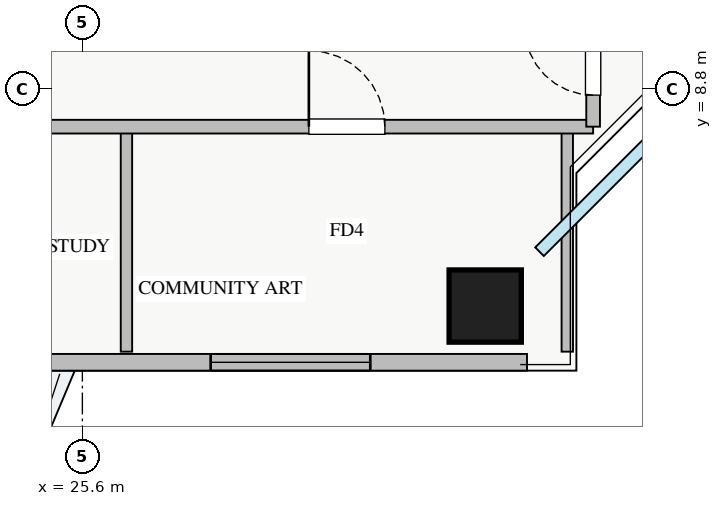
"""IFC4 building model, lengths in metres.
Left out: names, types, materials, properties, quantities, classifications, styles, units other than length and angle.
Written with IfcOpenShell. Run it as: python <this file> out.ifc"""

import sys

from ifc_helpers import new_model, si_unit, direction, frame, frame_2d, origin, origin_2d, place, context, subcontext, project, spatial, rectangle, extrude, source, transform, mapped, element, fill, save


model = new_model("IFC4")
c1 = context("Model", 3, precision=1e-05, world=origin(), true_north=direction((0.0, 1.0)))
c2 = subcontext(c1, "Body", "Model", "MODEL_VIEW")
j1 = project(units=[si_unit("LENGTHUNIT", "METRE"), si_unit("PLANEANGLEUNIT", "RADIAN")], contexts=[c1])
p1 = place(None, origin())
s1 = spatial("IfcSite", under=j1, at=p1, CompositionType="ELEMENT")
p2 = place(p1, origin())
s2 = spatial("IfcBuilding", under=s1, at=p2, CompositionType="ELEMENT")
p3 = place(p2, frame((0.0, 0.0, 173.0)))
s3 = spatial("IfcBuildingStorey", under=s2, at=p3, CompositionType="ELEMENT", Elevation=173.0)
m1 = source(origin(), c2, "Body", "SweptSolid", [
    extrude(rectangle(XDim=0.95, YDim=0.95, at=origin_2d()), origin(), (0.0, 0.0, 1.0), 3.25),
])
p4 = place(p3, frame((30.9, 5.95, 0.0), z_axis=(0.0, 0.0, 1.0), x_axis=(1.0, 0.0, 0.0)))
e1 = element("IfcColumn", 1, at=p4, inside=s3, PredefinedType="COLUMN", context=c2, shape_type="MappedRepresentation", body=[
    mapped(m1, transform((0.0, 0.0, 0.0), x_axis=(1.0, 0.0, 0.0), y_axis=(0.0, 1.0, 0.0), z_axis=(0.0, 0.0, 1.0), scale=1.0)),
])
p5 = place(p3, frame((6.55, 5.21, 0.0), z_axis=(0.0, 0.0, 1.0), x_axis=(1.0, 0.0, 0.0)))
e2 = element("IfcWall", 2, at=p5, inside=s3, PredefinedType="STANDARD", context=c2, shape_type="SweptSolid", body=[
    extrude(rectangle(XDim=24.9, YDim=0.22, at=frame_2d((12.45, 0.0))), origin(), (0.0, 0.0, 1.0), 2.54),
])
p6 = place(p5, frame((13.3, 0.0, 0.0)))
e3 = element("IfcOpeningElement", 3, at=p6, cuts=e2, PredefinedType="OPENING", context=c2, shape_type="SweptSolid", body=[
    extrude(rectangle(XDim=1.2, YDim=2.1, at=frame_2d((0.6, 1.05))), frame((0.0, 0.12, 0.0), z_axis=(0.0, -1.0, 0.0), x_axis=(1.0, 0.0, 0.0)), (0.0, 0.0, 1.0), 0.24),
])
p7 = place(p5, frame((0.373, 0.0, 0.9)))
e4 = element("IfcOpeningElement", 4, at=p7, cuts=e2, PredefinedType="OPENING", context=c2, shape_type="SweptSolid", body=[
    extrude(rectangle(XDim=1.5, YDim=1.5, at=frame_2d((0.75, 0.75))), frame((0.0, 0.12, 0.0), z_axis=(0.0, -1.0, 0.0), x_axis=(1.0, 0.0, 0.0)), (0.0, 0.0, 1.0), 0.24),
])
p8 = place(p5, frame((9.78, 0.0, 0.9)))
e5 = element("IfcOpeningElement", 5, at=p8, cuts=e2, PredefinedType="OPENING", context=c2, shape_type="SweptSolid", body=[
    extrude(rectangle(XDim=1.8, YDim=1.5, at=frame_2d((0.9, 0.75))), frame((0.0, 0.12, 0.0), z_axis=(0.0, -1.0, 0.0), x_axis=(1.0, 0.0, 0.0)), (0.0, 0.0, 1.0), 0.24),
])
p9 = place(p5, frame((14.813, 0.0, 0.9)))
e6 = element("IfcOpeningElement", 6, at=p9, cuts=e2, PredefinedType="OPENING", context=c2, shape_type="SweptSolid", body=[
    extrude(rectangle(XDim=1.5, YDim=1.45, at=frame_2d((0.75, 0.725))), frame((0.0, 0.12, 0.0), z_axis=(0.0, -1.0, 0.0), x_axis=(1.0, 0.0, 0.0)), (0.0, 0.0, 1.0), 0.24),
])
p10 = place(p5, frame((20.738, 0.0, 0.9)))
e7 = element("IfcOpeningElement", 7, at=p10, cuts=e2, PredefinedType="OPENING", context=c2, shape_type="SweptSolid", body=[
    extrude(rectangle(XDim=2.1, YDim=1.46, at=frame_2d((1.05, 0.73))), frame((0.0, 0.12, 0.0), z_axis=(0.0, -1.0, 0.0), x_axis=(1.0, 0.0, 0.0)), (0.0, 0.0, 1.0), 0.24),
])
p11 = place(p5, frame((4.152, 0.0, 0.9)))
e8 = element("IfcOpeningElement", 8, at=p11, cuts=e2, PredefinedType="OPENING", context=c2, shape_type="SweptSolid", body=[
    extrude(rectangle(XDim=2.4, YDim=1.5, at=frame_2d((1.2, 0.75))), frame((0.0, 0.12, 0.0), z_axis=(0.0, -1.0, 0.0), x_axis=(1.0, 0.0, 0.0)), (0.0, 0.0, 1.0), 0.24),
])
for number, where, z_axis, x_axis in (
    (9, (26.18, 5.35, 0.0), (0.0, 0.0, 1.0), (0.0, 1.0, 0.0)),
    (10, (31.98, 5.35, 0.0), (0.0, 0.0, 1.0), (0.0, 1.0, 0.0)),
):
    element("IfcWall", number, at=place(p3, frame(where, z_axis=z_axis, x_axis=x_axis)), inside=s3, PredefinedType="PARTITIONING", context=c2, shape_type="SweptSolid", body=[
        extrude(rectangle(XDim=2.96, YDim=0.15, at=frame_2d((1.48, 0.0))), origin(), (0.0, 0.0, 1.0), 3.0),
    ])
p12 = place(p3, frame((8.78, 8.31, 0.0), z_axis=(0.0, 0.0, 1.0), x_axis=(1.0, 0.0, 0.0)))
e11 = element("IfcWall", 11, at=p12, inside=s3, PredefinedType="PARTITIONING", context=c2, shape_type="SweptSolid", body=[
    extrude(rectangle(XDim=23.54, YDim=0.18, at=frame_2d((11.77, 0.0))), origin(), (0.0, 0.0, 1.0), 3.0),
])
p13 = place(p12, frame((2.79, 0.0, 0.0)))
e12 = element("IfcOpeningElement", 12, at=p13, cuts=e11, PredefinedType="OPENING", context=c2, shape_type="SweptSolid", body=[
    extrude(rectangle(XDim=1.0, YDim=2.05, at=frame_2d((0.5, 1.025))), frame((0.0, 0.1, 0.0), z_axis=(0.0, -1.0, 0.0), x_axis=(1.0, 0.0, 0.0)), (0.0, 0.0, 1.0), 0.2),
])
p14 = place(p12, frame((7.95, 0.0, 0.0)))
e13 = element("IfcOpeningElement", 13, at=p14, cuts=e11, PredefinedType="OPENING", context=c2, shape_type="SweptSolid", body=[
    extrude(rectangle(XDim=1.0, YDim=2.05, at=frame_2d((0.5, 1.025))), frame((0.0, 0.1, 0.0), z_axis=(0.0, -1.0, 0.0), x_axis=(1.0, 0.0, 0.0)), (0.0, 0.0, 1.0), 0.2),
])
p15 = place(p12, frame((13.36, 0.0, 0.0)))
e14 = element("IfcOpeningElement", 14, at=p15, cuts=e11, PredefinedType="OPENING", context=c2, shape_type="SweptSolid", body=[
    extrude(rectangle(XDim=1.0, YDim=2.05, at=frame_2d((0.5, 1.025))), frame((0.0, 0.1, 0.0), z_axis=(0.0, -1.0, 0.0), x_axis=(1.0, 0.0, 0.0)), (0.0, 0.0, 1.0), 0.2),
])
p16 = place(p12, frame((19.8, 0.0, 0.0)))
e15 = element("IfcOpeningElement", 15, at=p16, cuts=e11, PredefinedType="OPENING", context=c2, shape_type="SweptSolid", body=[
    extrude(rectangle(XDim=1.0, YDim=2.05, at=frame_2d((0.5, 1.025))), frame((0.0, 0.1, 0.0), z_axis=(0.0, -1.0, 0.0), x_axis=(1.0, 0.0, 0.0)), (0.0, 0.0, 1.0), 0.2),
])
p17 = place(p3, frame((32.32, 8.31, 0.0), z_axis=(0.0, 0.0, 1.0), x_axis=(0.0, 1.0, 0.0)))
e16 = element("IfcWall", 16, at=p17, inside=s3, PredefinedType="PARTITIONING", context=c2, shape_type="SweptSolid", body=[
    extrude(rectangle(XDim=29.34, YDim=0.18, at=frame_2d((14.67, 0.0))), origin(), (0.0, 0.0, 1.0), 3.0),
])
p18 = place(p17, frame((28.045, 0.0, 0.0)))
e17 = element("IfcOpeningElement", 17, at=p18, cuts=e16, PredefinedType="OPENING", context=c2, shape_type="SweptSolid", body=[
    extrude(rectangle(XDim=0.9, YDim=2.05, at=frame_2d((0.45, 1.025))), frame((0.0, 0.1, 0.0), z_axis=(0.0, -1.0, 0.0), x_axis=(1.0, 0.0, 0.0)), (0.0, 0.0, 1.0), 0.2),
])
p19 = place(p17, frame((0.415, 0.0, 0.0)))
e18 = element("IfcOpeningElement", 18, at=p19, cuts=e16, PredefinedType="OPENING", context=c2, shape_type="SweptSolid", body=[
    extrude(rectangle(XDim=0.9, YDim=2.05, at=frame_2d((0.45, 1.025))), frame((0.0, 0.1, 0.0), z_axis=(0.0, -1.0, 0.0), x_axis=(1.0, 0.0, 0.0)), (0.0, 0.0, 1.0), 0.2),
])
p20 = place(p17, frame((5.325, 0.0, 0.0)))
e19 = element("IfcOpeningElement", 19, at=p20, cuts=e16, PredefinedType="OPENING", context=c2, shape_type="SweptSolid", body=[
    extrude(rectangle(XDim=1.0, YDim=2.05, at=frame_2d((0.5, 1.025))), frame((0.0, 0.1, 0.0), z_axis=(0.0, -1.0, 0.0), x_axis=(1.0, 0.0, 0.0)), (0.0, 0.0, 1.0), 0.2),
])
p21 = place(p17, frame((14.095, 0.0, 0.0)))
e20 = element("IfcOpeningElement", 20, at=p21, cuts=e16, PredefinedType="OPENING", context=c2, shape_type="SweptSolid", body=[
    extrude(rectangle(XDim=1.0, YDim=2.05, at=frame_2d((0.5, 1.025))), frame((0.0, 0.1, 0.0), z_axis=(0.0, -1.0, 0.0), x_axis=(1.0, 0.0, 0.0)), (0.0, 0.0, 1.0), 0.2),
])
p22 = place(p17, frame((22.96, 0.0, 0.0)))
e21 = element("IfcOpeningElement", 21, at=p22, cuts=e16, PredefinedType="OPENING", context=c2, shape_type="SweptSolid", body=[
    extrude(rectangle(XDim=1.0, YDim=2.05, at=frame_2d((0.5, 1.025))), frame((0.0, 0.1, 0.0), z_axis=(0.0, -1.0, 0.0), x_axis=(1.0, 0.0, 0.0)), (0.0, 0.0, 1.0), 0.2),
])
m2 = source(origin(), c2, "Body", "SweptSolid", [
    extrude(rectangle(XDim=2.1, YDim=1.46, at=frame_2d((1.05, 0.73))), frame((0.0, 0.03, 0.0), z_axis=(0.0, -1.0, 0.0), x_axis=(1.0, 0.0, 0.0)), (0.0, 0.0, 1.0), 0.06),
])
p23 = place(p10, origin())
e22 = element("IfcWindow", 22, at=p23, inside=s3, PartitioningType="TRIPLE_PANEL_VERTICAL", PredefinedType="WINDOW", context=c2, shape_type="MappedRepresentation", body=[
    mapped(m2, transform((0.0, 0.0, 0.0), x_axis=(1.0, 0.0, 0.0), y_axis=(0.0, 1.0, 0.0), z_axis=(0.0, 0.0, 1.0), scale=1.0)),
])
fill(e7, e22)
m3 = source(origin(), c2, "Body", "SweptSolid", [
    extrude(rectangle(XDim=1.0, YDim=2.05, at=frame_2d((0.5, 1.025))), frame((0.0, 0.025, 0.0), z_axis=(0.0, -1.0, 0.0), x_axis=(1.0, 0.0, 0.0)), (0.0, 0.0, 1.0), 0.05),
])
p24 = place(p16, origin())
e23 = element("IfcDoor", 23, at=p24, inside=s3, OperationType="SINGLE_SWING_LEFT", PredefinedType="DOOR", context=c2, shape_type="MappedRepresentation", body=[
    mapped(m3, transform((0.0, 0.0, 0.0), x_axis=(1.0, 0.0, 0.0), y_axis=(0.0, 1.0, 0.0), z_axis=(0.0, 0.0, 1.0), scale=1.0)),
])
fill(e15, e23)
m4 = source(origin(), c2, "Body", "SweptSolid", [
    extrude(rectangle(XDim=0.9, YDim=2.05, at=frame_2d((0.45, 1.025))), frame((0.0, 0.025, 0.0), z_axis=(0.0, -1.0, 0.0), x_axis=(1.0, 0.0, 0.0)), (0.0, 0.0, 1.0), 0.05),
])
p25 = place(p19, origin())
e24 = element("IfcDoor", 24, at=p25, inside=s3, OperationType="SINGLE_SWING_RIGHT", PredefinedType="DOOR", context=c2, shape_type="MappedRepresentation", body=[
    mapped(m4, transform((0.0, 0.0, 0.0), x_axis=(1.0, 0.0, 0.0), y_axis=(0.0, 1.0, 0.0), z_axis=(0.0, 0.0, 1.0), scale=1.0)),
])
fill(e18, e24)
save(model, sys.argv[1])
